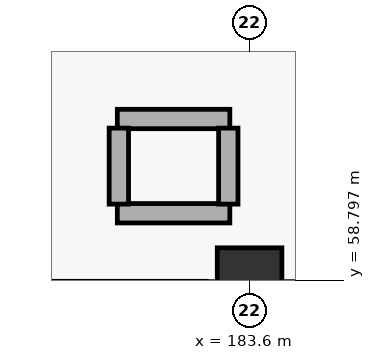
"""IFC4 building model, lengths in metres.
Left out: names, types, materials, properties, quantities, classifications, styles, units other than length and angle.
Written with IfcOpenShell. Run it as: python <this file> out.ifc"""

import sys

from ifc_helpers import new_model, si_unit, direction, frame, frame_2d, origin, origin_2d, place, context, subcontext, project, spatial, rectangle, extrude, element, save


model = new_model("IFC4")
c1 = context("Model", 3, precision=1e-05, world=origin(), true_north=direction((0.0, 1.0)))
c2 = subcontext(c1, "Body", "Model", "MODEL_VIEW")
j1 = project(units=[si_unit("LENGTHUNIT", "METRE"), si_unit("PLANEANGLEUNIT", "RADIAN")], contexts=[c1])
p1 = place(None, origin())
s1 = spatial("IfcSite", under=j1, at=p1, CompositionType="ELEMENT")
p2 = place(p1, origin())
s2 = spatial("IfcBuilding", under=s1, at=p2, CompositionType="ELEMENT")
p3 = place(p2, frame((0.0, 0.0, 5.4)))
s3 = spatial("IfcBuildingStorey", under=s2, at=p3, CompositionType="ELEMENT", Elevation=5.4)
p4 = place(p3, frame((183.6, 58.8, 0.0), z_axis=(0.0, 0.0, 1.0), x_axis=(1.0, 0.0, 0.0)))
e1 = element("IfcColumn", 1, at=p4, inside=s3, PredefinedType="COLUMN", context=c2, shape_type="SweptSolid", body=[
    extrude(rectangle(XDim=0.85, YDim=0.85, at=origin_2d()), origin(), (0.0, 0.0, 1.0), 5.1),
])
for number, where, z_axis, x_axis in (
    (2, (181.86, 60.92, 0.0), (0.0, 0.0, 1.0), (1.0, 0.0, 0.0)),
    (3, (181.86, 59.68, 0.0), (0.0, 0.0, 1.0), (1.0, 0.0, 0.0)),
):
    element("IfcWall", number, at=place(p3, frame(where, z_axis=z_axis, x_axis=x_axis)), inside=s3, PredefinedType="PARTITIONING", context=c2, shape_type="SweptSolid", body=[
        extrude(rectangle(XDim=1.48, YDim=0.255, at=frame_2d((0.74, 0.0))), origin(), (0.0, 0.0, 1.0), 3.77),
    ])
p5 = place(p3, frame((181.88, 59.8, 0.0), z_axis=(0.0, 0.0, 1.0), x_axis=(0.0, 1.0, 0.0)))
e4 = element("IfcWall", 4, at=p5, inside=s3, PredefinedType="PARTITIONING", context=c2, shape_type="SweptSolid", body=[
    extrude(rectangle(XDim=1.0, YDim=0.255, at=frame_2d((0.5, 0.0))), origin(), (0.0, 0.0, 1.0), 4.72),
])
p6 = place(p3, frame((183.32, 59.8, 0.0), z_axis=(0.0, 0.0, 1.0), x_axis=(0.0, 1.0, 0.0)))
e5 = element("IfcWall", 5, at=p6, inside=s3, PredefinedType="PARTITIONING", context=c2, shape_type="SweptSolid", body=[
    extrude(rectangle(XDim=1.0, YDim=0.255, at=frame_2d((0.5, 0.0))), origin(), (0.0, 0.0, 1.0), 3.77),
])
save(model, sys.argv[1])
